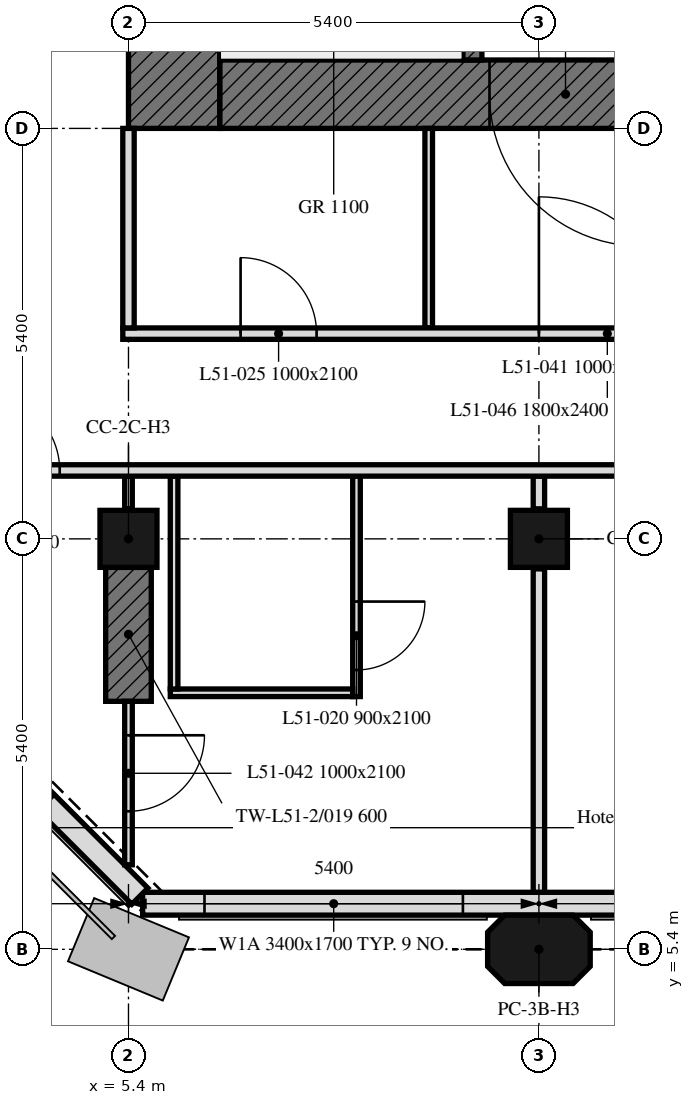
"""IFC4 building model, lengths in metres.
Left out: names, types, materials, properties, quantities, classifications, styles, units other than length and angle.
Written with IfcOpenShell. Run it as: python <this file> out.ifc"""

import sys

from ifc_helpers import new_model, si_unit, direction, frame, frame_2d, origin, origin_2d, place, context, subcontext, project, spatial, polyline, rectangle, outline, extrude, element, fill, save


model = new_model("IFC4")
c1 = context("Model", 3, precision=1e-05, world=origin(), true_north=direction((0.0, 1.0)))
c2 = subcontext(c1, "Body", "Model", "MODEL_VIEW")
j1 = project(units=[si_unit("LENGTHUNIT", "METRE"), si_unit("PLANEANGLEUNIT", "RADIAN")], contexts=[c1])
p1 = place(None, origin())
s1 = spatial("IfcSite", under=j1, at=p1, CompositionType="ELEMENT")
p2 = place(p1, origin())
s2 = spatial("IfcBuilding", under=s1, at=p2, CompositionType="ELEMENT")
p3 = place(p2, frame((0.0, 0.0, 207.1)))
s3 = spatial("IfcBuildingStorey", under=s2, at=p3, CompositionType="ELEMENT", Elevation=207.1)
p4 = place(p3, frame((10.8, 5.4, 0.0), z_axis=(0.0, 0.0, 1.0), x_axis=(1.0, 0.0, 0.0)))
e1 = element("IfcColumn", 1, at=p4, inside=s3, PredefinedType="COLUMN", context=c2, shape_type="SweptSolid", body=[
    extrude(outline(polyline([(-0.45, -0.45), (0.45, -0.45), (0.675, -0.225), (0.675, 0.225), (0.45, 0.45), (-0.45, 0.45), (-0.675, 0.225), (-0.675, -0.225), (-0.45, -0.45)])), origin(), (0.0, 0.0, 1.0), 3.0),
])
for number, where, z_axis, x_axis in (
    (2, (5.4, 10.8, 0.0), (0.0, 0.0, 1.0), (1.0, 0.0, 0.0)),
    (3, (10.8, 10.8, 0.0), (0.0, 0.0, 1.0), (1.0, 0.0, 0.0)),
):
    element("IfcColumn", number, at=place(p3, frame(where, z_axis=z_axis, x_axis=x_axis)), inside=s3, PredefinedType="COLUMN", context=c2, shape_type="SweptSolid", body=[
        extrude(rectangle(XDim=0.75, YDim=0.75, at=origin_2d()), origin(), (0.0, 0.0, 1.0), 3.0),
    ])
p5 = place(p3, frame((5.4, 8.663, 0.0), z_axis=(0.0, 0.0, 1.0), x_axis=(0.0, 1.0, 0.0)))
e4 = element("IfcWall", 4, at=p5, inside=s3, PredefinedType="SHEAR", context=c2, shape_type="SweptSolid", body=[
    extrude(rectangle(XDim=1.762, YDim=0.6, at=frame_2d((0.881, 0.0))), origin(), (0.0, 0.0, 1.0), 3.0),
])
p6 = place(p3, frame((5.586, 6.0, 0.0), z_axis=(0.0, 0.0, 1.0), x_axis=(1.0, 0.0, 0.0)))
e5 = element("IfcWall", 5, at=p6, inside=s3, PredefinedType="SOLIDWALL", context=c2, shape_type="SweptSolid", body=[
    extrude(rectangle(XDim=32.027, YDim=0.3, at=frame_2d((16.014, 0.0))), origin(), (0.0, 0.0, 1.0), 3.0),
])
p7 = place(p6, frame((0.814, 0.0, 0.9)))
e6 = element("IfcOpeningElement", 6, at=p7, cuts=e5, PredefinedType="OPENING", context=c2, shape_type="SweptSolid", body=[
    extrude(rectangle(XDim=3.4, YDim=1.7, at=frame_2d((1.7, 0.85))), frame((0.0, 0.16, 0.0), z_axis=(0.0, -1.0, 0.0), x_axis=(1.0, 0.0, 0.0)), (0.0, 0.0, 1.0), 0.32),
])
p8 = place(p6, frame((6.564, 0.0, 0.9)))
e7 = element("IfcOpeningElement", 7, at=p8, cuts=e5, PredefinedType="OPENING", context=c2, shape_type="SweptSolid", body=[
    extrude(rectangle(XDim=1.1, YDim=1.7, at=frame_2d((0.55, 0.85))), frame((0.0, 0.16, 0.0), z_axis=(0.0, -1.0, 0.0), x_axis=(1.0, 0.0, 0.0)), (0.0, 0.0, 1.0), 0.32),
])
p9 = place(p6, frame((11.614, 0.0, 0.9)))
e8 = element("IfcOpeningElement", 8, at=p9, cuts=e5, PredefinedType="OPENING", context=c2, shape_type="SweptSolid", body=[
    extrude(rectangle(XDim=3.4, YDim=1.7, at=frame_2d((1.7, 0.85))), frame((0.0, 0.16, 0.0), z_axis=(0.0, -1.0, 0.0), x_axis=(1.0, 0.0, 0.0)), (0.0, 0.0, 1.0), 0.32),
])
p10 = place(p6, frame((17.364, 0.0, 0.9)))
e9 = element("IfcOpeningElement", 9, at=p10, cuts=e5, PredefinedType="OPENING", context=c2, shape_type="SweptSolid", body=[
    extrude(rectangle(XDim=1.1, YDim=1.7, at=frame_2d((0.55, 0.85))), frame((0.0, 0.16, 0.0), z_axis=(0.0, -1.0, 0.0), x_axis=(1.0, 0.0, 0.0)), (0.0, 0.0, 1.0), 0.32),
])
p11 = place(p6, frame((22.414, 0.0, 0.9)))
e10 = element("IfcOpeningElement", 10, at=p11, cuts=e5, PredefinedType="OPENING", context=c2, shape_type="SweptSolid", body=[
    extrude(rectangle(XDim=3.4, YDim=1.7, at=frame_2d((1.7, 0.85))), frame((0.0, 0.16, 0.0), z_axis=(0.0, -1.0, 0.0), x_axis=(1.0, 0.0, 0.0)), (0.0, 0.0, 1.0), 0.32),
])
p12 = place(p6, frame((28.164, 0.0, 0.9)))
e11 = element("IfcOpeningElement", 11, at=p12, cuts=e5, PredefinedType="OPENING", context=c2, shape_type="SweptSolid", body=[
    extrude(rectangle(XDim=1.1, YDim=1.7, at=frame_2d((0.55, 0.85))), frame((0.0, 0.16, 0.0), z_axis=(0.0, -1.0, 0.0), x_axis=(1.0, 0.0, 0.0)), (0.0, 0.0, 1.0), 0.32),
])
p13 = place(p3, frame((0.699, 10.949, 0.0), z_axis=(0.0, 0.0, 1.0), x_axis=(0.707106781187, -0.707106781187, 0.0)))
e12 = element("IfcWall", 12, at=p13, inside=s3, PredefinedType="SOLIDWALL", context=c2, shape_type="SweptSolid", body=[
    extrude(rectangle(XDim=6.86, YDim=0.3, at=frame_2d((3.43, 0.0))), origin(), (0.0, 0.0, 1.0), 3.0),
])
p14 = place(p13, frame((1.73, 0.0, 0.9)))
e13 = element("IfcOpeningElement", 13, at=p14, cuts=e12, PredefinedType="OPENING", context=c2, shape_type="SweptSolid", body=[
    extrude(rectangle(XDim=3.4, YDim=1.7, at=frame_2d((1.7, 0.85))), frame((0.0, 0.16, 0.0), z_axis=(0.0, -1.0, 0.0), x_axis=(1.0, 0.0, 0.0)), (0.0, 0.0, 1.0), 0.32),
])
p15 = place(p3, frame((17.7, 16.65, 0.0), z_axis=(0.0, 0.0, 1.0), x_axis=(-1.0, 0.0, 0.0)))
e14 = element("IfcWall", 14, at=p15, inside=s3, PredefinedType="SOLIDWALL", context=c2, shape_type="SweptSolid", body=[
    extrude(rectangle(XDim=11.1, YDim=0.9, at=frame_2d((5.55, 0.0))), origin(), (0.0, 0.0, 1.0), 3.0),
])
p16 = place(p15, frame((5.55, 0.0, 0.0)))
e15 = element("IfcOpeningElement", 15, at=p16, cuts=e14, PredefinedType="OPENING", context=c2, shape_type="SweptSolid", body=[
    extrude(rectangle(XDim=2.0, YDim=2.4, at=frame_2d((1.0, 1.2))), frame((0.0, 0.45, 0.0), z_axis=(0.0, -1.0, 0.0), x_axis=(1.0, 0.0, 0.0)), (0.0, 0.0, 1.0), 0.9),
])
p17 = place(p3, frame((6.0, 16.2, 0.0), z_axis=(0.0, 0.0, 1.0), x_axis=(0.0, 1.0, 0.0)))
e16 = element("IfcWall", 16, at=p17, inside=s3, PredefinedType="SOLIDWALL", context=c2, shape_type="SweptSolid", body=[
    extrude(rectangle(XDim=16.2, YDim=1.2, at=frame_2d((8.1, 0.0))), origin(), (0.0, 0.0, 1.0), 3.0),
])
p18 = place(p3, frame((9.925, 17.1, 0.0), z_axis=(0.0, 0.0, 1.0), x_axis=(0.0, 1.0, 0.0)))
e17 = element("IfcWall", 17, at=p18, inside=s3, PredefinedType="SOLIDWALL", context=c2, shape_type="SweptSolid", body=[
    extrude(rectangle(XDim=14.4, YDim=0.25, at=frame_2d((7.2, 0.0))), origin(), (0.0, 0.0, 1.0), 3.0),
])
p19 = place(p18, frame((4.6, 0.0, 0.0)))
e18 = element("IfcOpeningElement", 18, at=p19, cuts=e17, PredefinedType="OPENING", context=c2, shape_type="SweptSolid", body=[
    extrude(rectangle(XDim=1.0, YDim=2.1, at=frame_2d((0.5, 1.05))), frame((0.0, 0.125, 0.0), z_axis=(0.0, -1.0, 0.0), x_axis=(1.0, 0.0, 0.0)), (0.0, 0.0, 1.0), 0.25),
])
p20 = place(p18, frame((7.062, 0.0, 0.0)))
e19 = element("IfcOpeningElement", 19, at=p20, cuts=e17, PredefinedType="OPENING", context=c2, shape_type="SweptSolid", body=[
    extrude(rectangle(XDim=1.2, YDim=2.1, at=frame_2d((0.6, 1.05))), frame((0.0, 0.125, 0.0), z_axis=(0.0, -1.0, 0.0), x_axis=(1.0, 0.0, 0.0)), (0.0, 0.0, 1.0), 0.25),
])
p21 = place(p18, frame((9.979, 0.0, 0.0)))
e20 = element("IfcOpeningElement", 20, at=p21, cuts=e17, PredefinedType="OPENING", context=c2, shape_type="SweptSolid", body=[
    extrude(rectangle(XDim=0.9, YDim=2.1, at=frame_2d((0.45, 1.05))), frame((0.0, 0.125, 0.0), z_axis=(0.0, -1.0, 0.0), x_axis=(1.0, 0.0, 0.0)), (0.0, 0.0, 1.0), 0.25),
])
p22 = place(p18, frame((11.92, 0.0, 0.0)))
e21 = element("IfcOpeningElement", 21, at=p22, cuts=e17, PredefinedType="OPENING", context=c2, shape_type="SweptSolid", body=[
    extrude(rectangle(XDim=0.9, YDim=2.1, at=frame_2d((0.45, 1.05))), frame((0.0, 0.125, 0.0), z_axis=(0.0, -1.0, 0.0), x_axis=(1.0, 0.0, 0.0)), (0.0, 0.0, 1.0), 0.25),
])
p23 = place(p18, frame((13.354, 0.0, 0.0)))
e22 = element("IfcOpeningElement", 22, at=p23, cuts=e17, PredefinedType="OPENING", context=c2, shape_type="SweptSolid", body=[
    extrude(rectangle(XDim=0.9, YDim=2.1, at=frame_2d((0.45, 1.05))), frame((0.0, 0.125, 0.0), z_axis=(0.0, -1.0, 0.0), x_axis=(1.0, 0.0, 0.0)), (0.0, 0.0, 1.0), 0.25),
])
p24 = place(p3, frame((10.8, 11.625, 0.0), z_axis=(0.0, 0.0, 1.0), x_axis=(0.0, -1.0, 0.0)))
e23 = element("IfcWall", 23, at=p24, inside=s3, PredefinedType="PARTITIONING", context=c2, shape_type="SweptSolid", body=[
    extrude(rectangle(XDim=0.43, YDim=0.15, at=frame_2d((0.215, 0.0))), origin(), (0.0, 0.0, 1.0), 3.0),
])
p25 = place(p3, frame((10.8, 10.405, 0.0), z_axis=(0.0, 0.0, 1.0), x_axis=(0.0, -1.0, 0.0)))
e24 = element("IfcWall", 24, at=p25, inside=s3, PredefinedType="PARTITIONING", context=c2, shape_type="SweptSolid", body=[
    extrude(rectangle(XDim=4.254, YDim=0.15, at=frame_2d((2.127, 0.0))), origin(), (0.0, 0.0, 1.0), 3.0),
])
p26 = place(p3, frame((8.4, 11.625, 0.0), z_axis=(0.0, 0.0, 1.0), x_axis=(0.0, -1.0, 0.0)))
e25 = element("IfcWall", 25, at=p26, inside=s3, PredefinedType="PARTITIONING", context=c2, shape_type="SweptSolid", body=[
    extrude(rectangle(XDim=2.9, YDim=0.1, at=frame_2d((1.45, 0.0))), origin(), (0.0, 0.0, 1.0), 3.0),
])
p27 = place(p26, frame((1.65, 0.0, 0.0)))
e26 = element("IfcOpeningElement", 26, at=p27, cuts=e25, PredefinedType="OPENING", context=c2, shape_type="SweptSolid", body=[
    extrude(rectangle(XDim=0.9, YDim=2.1, at=frame_2d((0.45, 1.05))), frame((0.0, 0.05, 0.0), z_axis=(0.0, -1.0, 0.0), x_axis=(1.0, 0.0, 0.0)), (0.0, 0.0, 1.0), 0.1),
])
p28 = place(p3, frame((8.35, 8.775, 0.0), z_axis=(0.0, 0.0, 1.0), x_axis=(-1.0, 0.0, 0.0)))
e27 = element("IfcWall", 27, at=p28, inside=s3, PredefinedType="PARTITIONING", context=c2, shape_type="SweptSolid", body=[
    extrude(rectangle(XDim=2.4, YDim=0.1, at=frame_2d((1.2, 0.0))), origin(), (0.0, 0.0, 1.0), 3.0),
])
p29 = place(p3, frame((6.0, 8.825, 0.0), z_axis=(0.0, 0.0, 1.0), x_axis=(0.0, 1.0, 0.0)))
e28 = element("IfcWall", 28, at=p29, inside=s3, PredefinedType="PARTITIONING", context=c2, shape_type="SweptSolid", body=[
    extrude(rectangle(XDim=2.8, YDim=0.1, at=frame_2d((1.4, 0.0))), origin(), (0.0, 0.0, 1.0), 3.0),
])
p30 = place(p3, frame((5.4, 11.625, 0.0), z_axis=(0.0, 0.0, 1.0), x_axis=(0.0, -1.0, 0.0)))
e29 = element("IfcWall", 29, at=p30, inside=s3, PredefinedType="PARTITIONING", context=c2, shape_type="SweptSolid", body=[
    extrude(rectangle(XDim=0.43, YDim=0.1, at=frame_2d((0.215, 0.0))), origin(), (0.0, 0.0, 1.0), 3.0),
])
p31 = place(p3, frame((5.4, 8.663, 0.0), z_axis=(0.0, 0.0, 1.0), x_axis=(0.0, -1.0, 0.0)))
e30 = element("IfcWall", 30, at=p31, inside=s3, PredefinedType="PARTITIONING", context=c2, shape_type="SweptSolid", body=[
    extrude(rectangle(XDim=2.15, YDim=0.1, at=frame_2d((1.075, 0.0))), origin(), (0.0, 0.0, 1.0), 3.0),
])
p32 = place(p31, frame((0.447, 0.0, 0.0)))
e31 = element("IfcOpeningElement", 31, at=p32, cuts=e30, PredefinedType="OPENING", context=c2, shape_type="SweptSolid", body=[
    extrude(rectangle(XDim=1.0, YDim=2.1, at=frame_2d((0.5, 1.05))), frame((0.0, 0.05, 0.0), z_axis=(0.0, -1.0, 0.0), x_axis=(1.0, 0.0, 0.0)), (0.0, 0.0, 1.0), 0.1),
])
p33 = place(p3, frame((0.751, 11.7, 0.0), z_axis=(0.0, 0.0, 1.0), x_axis=(1.0, 0.0, 0.0)))
e32 = element("IfcWall", 32, at=p33, inside=s3, PredefinedType="PARTITIONING", context=c2, shape_type="SweptSolid", body=[
    extrude(rectangle(XDim=41.698, YDim=0.15, at=frame_2d((20.849, 0.0))), origin(), (0.0, 0.0, 1.0), 3.0),
])
p34 = place(p33, frame((27.649, 0.0, 0.0)))
e33 = element("IfcOpeningElement", 33, at=p34, cuts=e32, PredefinedType="OPENING", context=c2, shape_type="SweptSolid", body=[
    extrude(rectangle(XDim=1.0, YDim=2.1, at=frame_2d((0.5, 1.05))), frame((0.0, 0.075, 0.0), z_axis=(0.0, -1.0, 0.0), x_axis=(1.0, 0.0, 0.0)), (0.0, 0.0, 1.0), 0.15),
])
p35 = place(p33, frame((22.249, 0.0, 0.0)))
e34 = element("IfcOpeningElement", 34, at=p35, cuts=e32, PredefinedType="OPENING", context=c2, shape_type="SweptSolid", body=[
    extrude(rectangle(XDim=1.0, YDim=2.1, at=frame_2d((0.5, 1.05))), frame((0.0, 0.075, 0.0), z_axis=(0.0, -1.0, 0.0), x_axis=(1.0, 0.0, 0.0)), (0.0, 0.0, 1.0), 0.15),
])
p36 = place(p33, frame((16.849, 0.0, 0.0)))
e35 = element("IfcOpeningElement", 35, at=p36, cuts=e32, PredefinedType="OPENING", context=c2, shape_type="SweptSolid", body=[
    extrude(rectangle(XDim=1.0, YDim=2.1, at=frame_2d((0.5, 1.05))), frame((0.0, 0.075, 0.0), z_axis=(0.0, -1.0, 0.0), x_axis=(1.0, 0.0, 0.0)), (0.0, 0.0, 1.0), 0.15),
])
p37 = place(p33, frame((11.449, 0.0, 0.0)))
e36 = element("IfcOpeningElement", 36, at=p37, cuts=e32, PredefinedType="OPENING", context=c2, shape_type="SweptSolid", body=[
    extrude(rectangle(XDim=1.0, YDim=2.1, at=frame_2d((0.5, 1.05))), frame((0.0, 0.075, 0.0), z_axis=(0.0, -1.0, 0.0), x_axis=(1.0, 0.0, 0.0)), (0.0, 0.0, 1.0), 0.15),
])
p38 = place(p33, frame((2.744, 0.0, 0.0)))
e37 = element("IfcOpeningElement", 37, at=p38, cuts=e32, PredefinedType="OPENING", context=c2, shape_type="SweptSolid", body=[
    extrude(rectangle(XDim=1.0, YDim=2.1, at=frame_2d((0.5, 1.05))), frame((0.0, 0.075, 0.0), z_axis=(0.0, -1.0, 0.0), x_axis=(1.0, 0.0, 0.0)), (0.0, 0.0, 1.0), 0.15),
])
p39 = place(p33, frame((39.249, 0.0, 0.0)))
e38 = element("IfcOpeningElement", 38, at=p39, cuts=e32, PredefinedType="OPENING", context=c2, shape_type="SweptSolid", body=[
    extrude(rectangle(XDim=1.0, YDim=2.1, at=frame_2d((0.5, 1.05))), frame((0.0, 0.075, 0.0), z_axis=(0.0, -1.0, 0.0), x_axis=(1.0, 0.0, 0.0)), (0.0, 0.0, 1.0), 0.15),
])
p40 = place(p3, frame((9.35, 16.2, 0.0), z_axis=(0.0, 0.0, 1.0), x_axis=(0.0, -1.0, 0.0)))
e39 = element("IfcWall", 39, at=p40, inside=s3, PredefinedType="PARTITIONING", context=c2, shape_type="SweptSolid", body=[
    extrude(rectangle(XDim=2.625, YDim=0.1, at=frame_2d((1.312, 0.0))), origin(), (0.0, 0.0, 1.0), 3.0),
])
p41 = place(p3, frame((5.325, 13.5, 0.0), z_axis=(0.0, 0.0, 1.0), x_axis=(1.0, 0.0, 0.0)))
e40 = element("IfcWall", 40, at=p41, inside=s3, PredefinedType="PARTITIONING", context=c2, shape_type="SweptSolid", body=[
    extrude(rectangle(XDim=7.525, YDim=0.15, at=frame_2d((3.763, 0.0))), origin(), (0.0, 0.0, 1.0), 3.0),
])
p42 = place(p41, frame((1.55, 0.0, 0.0)))
e41 = element("IfcOpeningElement", 41, at=p42, cuts=e40, PredefinedType="OPENING", context=c2, shape_type="SweptSolid", body=[
    extrude(rectangle(XDim=1.0, YDim=2.1, at=frame_2d((0.5, 1.05))), frame((0.0, 0.075, 0.0), z_axis=(0.0, -1.0, 0.0), x_axis=(1.0, 0.0, 0.0)), (0.0, 0.0, 1.0), 0.15),
])
p43 = place(p41, frame((5.475, 0.0, 0.0)))
e42 = element("IfcOpeningElement", 42, at=p43, cuts=e40, PredefinedType="OPENING", context=c2, shape_type="SweptSolid", body=[
    extrude(rectangle(XDim=1.8, YDim=2.4, at=frame_2d((0.9, 1.2))), frame((0.0, 0.075, 0.0), z_axis=(0.0, -1.0, 0.0), x_axis=(1.0, 0.0, 0.0)), (0.0, 0.0, 1.0), 0.15),
])
p44 = place(p3, frame((5.4, 13.575, 0.0), z_axis=(0.0, 0.0, 1.0), x_axis=(0.0, 1.0, 0.0)))
e43 = element("IfcWall", 43, at=p44, inside=s3, PredefinedType="PARTITIONING", context=c2, shape_type="SweptSolid", body=[
    extrude(rectangle(XDim=2.625, YDim=0.15, at=frame_2d((1.312, 0.0))), origin(), (0.0, 0.0, 1.0), 3.0),
])
p45 = place(p7, origin())
e44 = element("IfcWindow", 44, at=p45, inside=s3, PartitioningType="SINGLE_PANEL", PredefinedType="WINDOW", context=c2, shape_type="SweptSolid", body=[
    extrude(rectangle(XDim=3.4, YDim=1.7, at=frame_2d((1.7, 0.85))), frame((0.0, 0.03, 0.0), z_axis=(0.0, -1.0, 0.0), x_axis=(1.0, 0.0, 0.0)), (0.0, 0.0, 1.0), 0.06),
])
fill(e6, e44)
p46 = place(p16, origin())
e45 = element("IfcDoor", 45, at=p46, inside=s3, OperationType="DOUBLE_DOOR_SINGLE_SWING", PredefinedType="DOOR", context=c2, shape_type="SweptSolid", body=[
    extrude(rectangle(XDim=2.0, YDim=2.4, at=frame_2d((1.0, 1.2))), frame((0.0, 0.025, 0.0), z_axis=(0.0, -1.0, 0.0), x_axis=(1.0, 0.0, 0.0)), (0.0, 0.0, 1.0), 0.05),
])
fill(e15, e45)
p47 = place(p27, origin())
e46 = element("IfcDoor", 46, at=p47, inside=s3, OperationType="SINGLE_SWING_RIGHT", PredefinedType="DOOR", context=c2, shape_type="SweptSolid", body=[
    extrude(rectangle(XDim=0.9, YDim=2.1, at=frame_2d((0.45, 1.05))), frame((0.0, 0.025, 0.0), z_axis=(0.0, -1.0, 0.0), x_axis=(1.0, 0.0, 0.0)), (0.0, 0.0, 1.0), 0.05),
])
fill(e26, e46)
p48 = place(p42, origin())
e47 = element("IfcDoor", 47, at=p48, inside=s3, OperationType="SINGLE_SWING_LEFT", PredefinedType="DOOR", context=c2, shape_type="SweptSolid", body=[
    extrude(rectangle(XDim=1.0, YDim=2.1, at=frame_2d((0.5, 1.05))), frame((0.0, 0.025, 0.0), z_axis=(0.0, -1.0, 0.0), x_axis=(1.0, 0.0, 0.0)), (0.0, 0.0, 1.0), 0.05),
])
fill(e41, e47)
p49 = place(p32, origin())
e48 = element("IfcDoor", 48, at=p49, inside=s3, OperationType="SINGLE_SWING_RIGHT", PredefinedType="DOOR", context=c2, shape_type="SweptSolid", body=[
    extrude(rectangle(XDim=1.0, YDim=2.1, at=frame_2d((0.5, 1.05))), frame((0.0, 0.025, 0.0), z_axis=(0.0, -1.0, 0.0), x_axis=(1.0, 0.0, 0.0)), (0.0, 0.0, 1.0), 0.05),
])
fill(e31, e48)
p50 = place(p38, origin())
e49 = element("IfcDoor", 49, at=p50, inside=s3, OperationType="SINGLE_SWING_RIGHT", PredefinedType="DOOR", context=c2, shape_type="SweptSolid", body=[
    extrude(rectangle(XDim=1.0, YDim=2.1, at=frame_2d((0.5, 1.05))), frame((0.0, 0.025, 0.0), z_axis=(0.0, -1.0, 0.0), x_axis=(1.0, 0.0, 0.0)), (0.0, 0.0, 1.0), 0.05),
])
fill(e37, e49)
p51 = place(p43, origin())
e50 = element("IfcDoor", 50, at=p51, inside=s3, OperationType="DOUBLE_DOOR_SINGLE_SWING", PredefinedType="DOOR", context=c2, shape_type="SweptSolid", body=[
    extrude(rectangle(XDim=1.8, YDim=2.4, at=frame_2d((0.9, 1.2))), frame((0.0, 0.025, 0.0), z_axis=(0.0, -1.0, 0.0), x_axis=(1.0, 0.0, 0.0)), (0.0, 0.0, 1.0), 0.05),
])
fill(e42, e50)
save(model, sys.argv[1])
